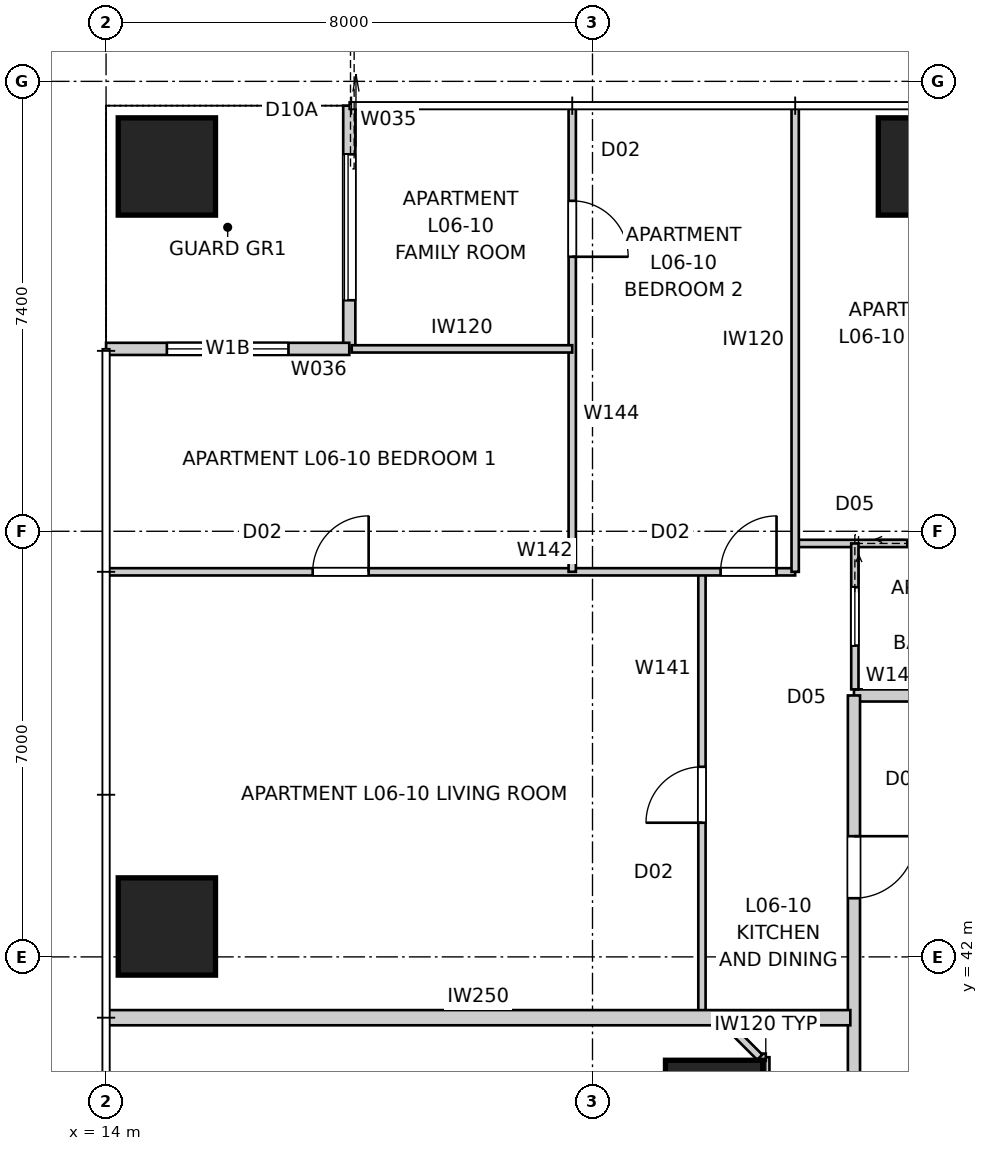
"""IFC4 building model, lengths in metres.
Left out: names, types, materials, properties, quantities, classifications, styles, units other than length and angle.
Written with IfcOpenShell. Run it as: python <this file> out.ifc"""

import sys

from ifc_helpers import new_model, si_unit, direction, frame, frame_2d, origin, origin_2d, place, context, subcontext, project, spatial, rectangle, extrude, element, fill, save


model = new_model("IFC4")
c1 = context("Model", 3, precision=1e-05, world=origin(), true_north=direction((0.0, 1.0)))
c2 = subcontext(c1, "Body", "Model", "MODEL_VIEW")
j1 = project(units=[si_unit("LENGTHUNIT", "METRE"), si_unit("PLANEANGLEUNIT", "RADIAN")], contexts=[c1])
p1 = place(None, origin())
s1 = spatial("IfcSite", under=j1, at=p1, CompositionType="ELEMENT")
p2 = place(p1, origin())
s2 = spatial("IfcBuilding", under=s1, at=p2, CompositionType="ELEMENT")
p3 = place(p2, frame((0.0, 0.0, 25.2)))
s3 = spatial("IfcBuildingStorey", under=s2, at=p3, CompositionType="ELEMENT", Elevation=25.2)
for number, where, z_axis, x_axis in (
    (1, (27.5, 55.0, 0.0), (0.0, 0.0, 1.0), (1.0, 0.0, 0.0)),
    (2, (15.0, 55.0, 0.0), (0.0, 0.0, 1.0), (1.0, 0.0, 0.0)),
    (3, (15.0, 42.5, 0.0), (0.0, 0.0, 1.0), (1.0, 0.0, 0.0)),
    (4, (24.0, 39.5, 0.0), (0.0, 0.0, 1.0), (1.0, 0.0, 0.0)),
):
    element("IfcColumn", number, at=place(p3, frame(where, z_axis=z_axis, x_axis=x_axis)), inside=s3, PredefinedType="COLUMN", context=c2, shape_type="SweptSolid", body=[
        extrude(rectangle(XDim=1.6, YDim=1.6, at=origin_2d()), origin(), (0.0, 0.0, 1.0), 3.4),
    ])
p4 = place(p3, frame((18.0, 56.0, 0.0), z_axis=(0.0, 0.0, 1.0), x_axis=(0.0, -1.0, 0.0)))
e5 = element("IfcWall", 5, at=p4, inside=s3, PredefinedType="SOLIDWALL", context=c2, shape_type="SweptSolid", body=[
    extrude(rectangle(XDim=4.0, YDim=0.2, at=frame_2d((2.0, 0.0))), origin(), (0.0, 0.0, 1.0), 3.25),
])
p5 = place(p4, frame((0.8, 0.0, 0.0)))
e6 = element("IfcOpeningElement", 6, at=p5, cuts=e5, PredefinedType="OPENING", context=c2, shape_type="SweptSolid", body=[
    extrude(rectangle(XDim=2.4, YDim=2.1, at=frame_2d((1.2, 1.05))), frame((0.0, 0.11, 0.0), z_axis=(0.0, -1.0, 0.0), x_axis=(1.0, 0.0, 0.0)), (0.0, 0.0, 1.0), 0.22),
])
p6 = place(p3, frame((18.0, 52.0, 0.0), z_axis=(0.0, 0.0, 1.0), x_axis=(-1.0, 0.0, 0.0)))
e7 = element("IfcWall", 7, at=p6, inside=s3, PredefinedType="SOLIDWALL", context=c2, shape_type="SweptSolid", body=[
    extrude(rectangle(XDim=4.0, YDim=0.2, at=frame_2d((2.0, 0.0))), origin(), (0.0, 0.0, 1.0), 3.25),
])
p7 = place(p6, frame((1.0, 0.0, 0.45)))
e8 = element("IfcOpeningElement", 8, at=p7, cuts=e7, PredefinedType="OPENING", context=c2, shape_type="SweptSolid", body=[
    extrude(rectangle(XDim=2.0, YDim=1.8, at=frame_2d((1.0, 0.9))), frame((0.0, 0.11, 0.0), z_axis=(0.0, -1.0, 0.0), x_axis=(1.0, 0.0, 0.0)), (0.0, 0.0, 1.0), 0.22),
])
p8 = place(p3, frame((30.758, 46.3, 0.0), z_axis=(0.0, 0.0, 1.0), x_axis=(-1.0, 0.0, 0.0)))
e9 = element("IfcWall", 9, at=p8, inside=s3, PredefinedType="PARTITIONING", context=c2, shape_type="SweptSolid", body=[
    extrude(rectangle(XDim=4.458, YDim=0.2, at=frame_2d((2.229, 0.0))), origin(), (0.0, 0.0, 1.0), 3.25),
])
p9 = place(p3, frame((26.3, 46.3, 0.0), z_axis=(0.0, 0.0, 1.0), x_axis=(0.0, -1.0, 0.0)))
e10 = element("IfcWall", 10, at=p9, inside=s3, PredefinedType="PARTITIONING", context=c2, shape_type="SweptSolid", body=[
    extrude(rectangle(XDim=32.6, YDim=0.2, at=frame_2d((16.3, 0.0))), origin(), (0.0, 0.0, 1.0), 3.25),
])
p10 = place(p9, frame((2.315, 0.0, 0.0)))
e11 = element("IfcOpeningElement", 11, at=p10, cuts=e10, PredefinedType="OPENING", context=c2, shape_type="SweptSolid", body=[
    extrude(rectangle(XDim=1.02, YDim=2.34, at=frame_2d((0.51, 1.17))), frame((0.0, 0.11, 0.0), z_axis=(0.0, -1.0, 0.0), x_axis=(1.0, 0.0, 0.0)), (0.0, 0.0, 1.0), 0.22),
])
p11 = place(p9, frame((10.624, 0.0, 0.0)))
e12 = element("IfcOpeningElement", 12, at=p11, cuts=e10, PredefinedType="OPENING", context=c2, shape_type="SweptSolid", body=[
    extrude(rectangle(XDim=1.02, YDim=2.34, at=frame_2d((0.51, 1.17))), frame((0.0, 0.11, 0.0), z_axis=(0.0, -1.0, 0.0), x_axis=(1.0, 0.0, 0.0)), (0.0, 0.0, 1.0), 0.22),
])
p12 = place(p9, frame((17.848, 0.0, 0.0)))
e13 = element("IfcOpeningElement", 13, at=p12, cuts=e10, PredefinedType="OPENING", context=c2, shape_type="SweptSolid", body=[
    extrude(rectangle(XDim=1.02, YDim=2.34, at=frame_2d((0.51, 1.17))), frame((0.0, 0.11, 0.0), z_axis=(0.0, -1.0, 0.0), x_axis=(1.0, 0.0, 0.0)), (0.0, 0.0, 1.0), 0.22),
])
p13 = place(p9, frame((30.516, 0.0, 0.0)))
e14 = element("IfcOpeningElement", 14, at=p13, cuts=e10, PredefinedType="OPENING", context=c2, shape_type="SweptSolid", body=[
    extrude(rectangle(XDim=1.02, YDim=2.34, at=frame_2d((0.51, 1.17))), frame((0.0, 0.11, 0.0), z_axis=(0.0, -1.0, 0.0), x_axis=(1.0, 0.0, 0.0)), (0.0, 0.0, 1.0), 0.22),
])
p14 = place(p3, frame((14.0, 41.0, 0.0), z_axis=(0.0, 0.0, 1.0), x_axis=(1.0, 0.0, 0.0)))
e15 = element("IfcWall", 15, at=p14, inside=s3, PredefinedType="PARTITIONING", context=c2, shape_type="SweptSolid", body=[
    extrude(rectangle(XDim=12.24, YDim=0.25, at=frame_2d((6.12, 0.0))), origin(), (0.0, 0.0, 1.0), 3.25),
])
p15 = place(p3, frame((25.333, 48.8, 0.0), z_axis=(0.0, 0.0, 1.0), x_axis=(1.0, 0.0, 0.0)))
e16 = element("IfcWall", 16, at=p15, inside=s3, PredefinedType="PARTITIONING", context=c2, shape_type="SweptSolid", body=[
    extrude(rectangle(XDim=29.333, YDim=0.12, at=frame_2d((14.667, 0.0))), origin(), (0.0, 0.0, 1.0), 3.25),
])
p16 = place(p15, frame((19.707, 0.0, 0.0)))
e17 = element("IfcOpeningElement", 17, at=p16, cuts=e16, PredefinedType="OPENING", context=c2, shape_type="SweptSolid", body=[
    extrude(rectangle(XDim=0.92, YDim=2.34, at=frame_2d((0.46, 1.17))), frame((0.0, 0.07, 0.0), z_axis=(0.0, -1.0, 0.0), x_axis=(1.0, 0.0, 0.0)), (0.0, 0.0, 1.0), 0.14),
])
p17 = place(p15, frame((23.348, 0.0, 0.0)))
e18 = element("IfcOpeningElement", 18, at=p17, cuts=e16, PredefinedType="OPENING", context=c2, shape_type="SweptSolid", body=[
    extrude(rectangle(XDim=0.92, YDim=2.34, at=frame_2d((0.46, 1.17))), frame((0.0, 0.07, 0.0), z_axis=(0.0, -1.0, 0.0), x_axis=(1.0, 0.0, 0.0)), (0.0, 0.0, 1.0), 0.14),
])
p18 = place(p15, frame((16.884, 0.0, 0.0)))
e19 = element("IfcOpeningElement", 19, at=p18, cuts=e16, PredefinedType="OPENING", context=c2, shape_type="SweptSolid", body=[
    extrude(rectangle(XDim=0.92, YDim=2.34, at=frame_2d((0.46, 1.17))), frame((0.0, 0.07, 0.0), z_axis=(0.0, -1.0, 0.0), x_axis=(1.0, 0.0, 0.0)), (0.0, 0.0, 1.0), 0.14),
])
p19 = place(p15, frame((26.549, 0.0, 0.0)))
e20 = element("IfcOpeningElement", 20, at=p19, cuts=e16, PredefinedType="OPENING", context=c2, shape_type="SweptSolid", body=[
    extrude(rectangle(XDim=0.96, YDim=2.1, at=frame_2d((0.48, 1.05))), frame((0.0, 0.07, 0.0), z_axis=(0.0, -1.0, 0.0), x_axis=(1.0, 0.0, 0.0)), (0.0, 0.0, 1.0), 0.14),
])
p20 = place(p15, frame((1.844, 0.0, 0.0)))
e21 = element("IfcOpeningElement", 21, at=p20, cuts=e16, PredefinedType="OPENING", context=c2, shape_type="SweptSolid", body=[
    extrude(rectangle(XDim=0.96, YDim=2.1, at=frame_2d((0.48, 1.05))), frame((0.0, 0.07, 0.0), z_axis=(0.0, -1.0, 0.0), x_axis=(1.0, 0.0, 0.0)), (0.0, 0.0, 1.0), 0.14),
])
p21 = place(p15, frame((8.484, 0.0, 0.0)))
e22 = element("IfcOpeningElement", 22, at=p21, cuts=e16, PredefinedType="OPENING", context=c2, shape_type="SweptSolid", body=[
    extrude(rectangle(XDim=0.96, YDim=2.1, at=frame_2d((0.48, 1.05))), frame((0.0, 0.07, 0.0), z_axis=(0.0, -1.0, 0.0), x_axis=(1.0, 0.0, 0.0)), (0.0, 0.0, 1.0), 0.14),
])
p22 = place(p3, frame((26.315, 48.8, 0.0), z_axis=(0.0, 0.0, 1.0), x_axis=(0.0, -1.0, 0.0)))
e23 = element("IfcWall", 23, at=p22, inside=s3, PredefinedType="PARTITIONING", context=c2, shape_type="SweptSolid", body=[
    extrude(rectangle(XDim=2.4, YDim=0.12, at=frame_2d((1.2, 0.0))), origin(), (0.0, 0.0, 1.0), 3.25),
])
p23 = place(p22, frame((0.72, 0.0, 0.0)))
e24 = element("IfcOpeningElement", 24, at=p23, cuts=e23, PredefinedType="OPENING", context=c2, shape_type="SweptSolid", body=[
    extrude(rectangle(XDim=0.96, YDim=2.1, at=frame_2d((0.48, 1.05))), frame((0.0, 0.07, 0.0), z_axis=(0.0, -1.0, 0.0), x_axis=(1.0, 0.0, 0.0)), (0.0, 0.0, 1.0), 0.14),
])
p24 = place(p3, frame((23.8, 41.0, 0.0), z_axis=(0.0, 0.0, 1.0), x_axis=(0.0, 1.0, 0.0)))
e25 = element("IfcWall", 25, at=p24, inside=s3, PredefinedType="PARTITIONING", context=c2, shape_type="SweptSolid", body=[
    extrude(rectangle(XDim=7.333, YDim=0.12, at=frame_2d((3.667, 0.0))), origin(), (0.0, 0.0, 1.0), 3.25),
])
p25 = place(p24, frame((3.207, 0.0, 0.0)))
e26 = element("IfcOpeningElement", 26, at=p25, cuts=e25, PredefinedType="OPENING", context=c2, shape_type="SweptSolid", body=[
    extrude(rectangle(XDim=0.92, YDim=2.34, at=frame_2d((0.46, 1.17))), frame((0.0, 0.07, 0.0), z_axis=(0.0, -1.0, 0.0), x_axis=(1.0, 0.0, 0.0)), (0.0, 0.0, 1.0), 0.14),
])
p26 = place(p3, frame((14.04, 48.333, 0.0), z_axis=(0.0, 0.0, 1.0), x_axis=(1.0, 0.0, 0.0)))
e27 = element("IfcWall", 27, at=p26, inside=s3, PredefinedType="PARTITIONING", context=c2, shape_type="SweptSolid", body=[
    extrude(rectangle(XDim=11.293, YDim=0.12, at=frame_2d((5.646, 0.0))), origin(), (0.0, 0.0, 1.0), 3.25),
])
p27 = place(p26, frame((10.067, 0.0, 0.0)))
e28 = element("IfcOpeningElement", 28, at=p27, cuts=e27, PredefinedType="OPENING", context=c2, shape_type="SweptSolid", body=[
    extrude(rectangle(XDim=0.92, YDim=2.34, at=frame_2d((0.46, 1.17))), frame((0.0, 0.07, 0.0), z_axis=(0.0, -1.0, 0.0), x_axis=(1.0, 0.0, 0.0)), (0.0, 0.0, 1.0), 0.14),
])
p28 = place(p26, frame((3.358, 0.0, 0.0)))
e29 = element("IfcOpeningElement", 29, at=p28, cuts=e27, PredefinedType="OPENING", context=c2, shape_type="SweptSolid", body=[
    extrude(rectangle(XDim=0.92, YDim=2.34, at=frame_2d((0.46, 1.17))), frame((0.0, 0.07, 0.0), z_axis=(0.0, -1.0, 0.0), x_axis=(1.0, 0.0, 0.0)), (0.0, 0.0, 1.0), 0.14),
])
p29 = place(p3, frame((25.333, 48.333, 0.0), z_axis=(0.0, 0.0, 1.0), x_axis=(0.0, 1.0, 0.0)))
e30 = element("IfcWall", 30, at=p29, inside=s3, PredefinedType="PARTITIONING", context=c2, shape_type="SweptSolid", body=[
    extrude(rectangle(XDim=7.627, YDim=0.12, at=frame_2d((3.813, 0.0))), origin(), (0.0, 0.0, 1.0), 2.637),
])
p30 = place(p3, frame((21.667, 55.96, 0.0), z_axis=(0.0, 0.0, 1.0), x_axis=(0.0, -1.0, 0.0)))
e31 = element("IfcWall", 31, at=p30, inside=s3, PredefinedType="PARTITIONING", context=c2, shape_type="SweptSolid", body=[
    extrude(rectangle(XDim=7.627, YDim=0.12, at=frame_2d((3.813, 0.0))), origin(), (0.0, 0.0, 1.0), 3.25),
])
p31 = place(p30, frame((1.525, 0.0, 0.0)))
e32 = element("IfcOpeningElement", 32, at=p31, cuts=e31, PredefinedType="OPENING", context=c2, shape_type="SweptSolid", body=[
    extrude(rectangle(XDim=0.92, YDim=2.34, at=frame_2d((0.46, 1.17))), frame((0.0, 0.07, 0.0), z_axis=(0.0, -1.0, 0.0), x_axis=(1.0, 0.0, 0.0)), (0.0, 0.0, 1.0), 0.14),
])
p32 = place(p3, frame((18.04, 52.0, 0.0), z_axis=(0.0, 0.0, 1.0), x_axis=(1.0, 0.0, 0.0)))
e33 = element("IfcWall", 33, at=p32, inside=s3, PredefinedType="PARTITIONING", context=c2, shape_type="SweptSolid", body=[
    extrude(rectangle(XDim=3.627, YDim=0.12, at=frame_2d((1.813, 0.0))), origin(), (0.0, 0.0, 1.0), 3.25),
])
p33 = place(p3, frame((24.85, 38.65, 0.0), z_axis=(0.0, 0.0, 1.0), x_axis=(0.0, 1.0, 0.0)))
e34 = element("IfcWall", 34, at=p33, inside=s3, PredefinedType="PARTITIONING", context=c2, shape_type="SweptSolid", body=[
    extrude(rectangle(XDim=1.7, YDim=0.12, at=frame_2d((0.85, 0.0))), origin(), (0.0, 0.0, 1.0), 3.25),
])
p34 = place(p3, frame((24.75, 40.35, 0.0), z_axis=(0.0, 0.0, 1.0), x_axis=(-0.707106781187, 0.707106781187, 0.0)))
e35 = element("IfcWall", 35, at=p34, inside=s3, PredefinedType="PARTITIONING", context=c2, shape_type="SweptSolid", body=[
    extrude(rectangle(XDim=0.919, YDim=0.12, at=frame_2d((0.459, 0.0))), origin(), (0.0, 0.0, 1.0), 3.25),
])
p35 = place(p3, frame((24.85, 40.35, 0.0), z_axis=(0.0, 0.0, 1.0), x_axis=(-1.0, 0.0, 0.0)))
e36 = element("IfcWall", 36, at=p35, inside=s3, PredefinedType="PARTITIONING", context=c2, shape_type="SweptSolid", body=[
    extrude(rectangle(XDim=0.1, YDim=0.12, at=frame_2d((0.05, 0.0))), origin(), (0.0, 0.0, 1.0), 3.25),
])
p36 = place(p5, origin())
e37 = element("IfcDoor", 37, at=p36, inside=s3, OperationType="SLIDING_TO_LEFT", PredefinedType="DOOR", context=c2, shape_type="SweptSolid", body=[
    extrude(rectangle(XDim=2.4, YDim=2.1, at=frame_2d((1.2, 1.05))), frame((0.0, 0.025, 0.0), z_axis=(0.0, -1.0, 0.0), x_axis=(1.0, 0.0, 0.0)), (0.0, 0.0, 1.0), 0.05),
])
fill(e6, e37)
p37 = place(p7, origin())
e38 = element("IfcWindow", 38, at=p37, inside=s3, PartitioningType="SINGLE_PANEL", PredefinedType="WINDOW", context=c2, shape_type="SweptSolid", body=[
    extrude(rectangle(XDim=2.0, YDim=1.8, at=frame_2d((1.0, 0.9))), frame((0.0, 0.03, 0.0), z_axis=(0.0, -1.0, 0.0), x_axis=(1.0, 0.0, 0.0)), (0.0, 0.0, 1.0), 0.06),
])
fill(e8, e38)
p38 = place(p10, origin())
e39 = element("IfcDoor", 39, at=p38, inside=s3, OperationType="SINGLE_SWING_LEFT", PredefinedType="DOOR", context=c2, shape_type="SweptSolid", body=[
    extrude(rectangle(XDim=1.02, YDim=2.34, at=frame_2d((0.51, 1.17))), frame((0.0, 0.025, 0.0), z_axis=(0.0, -1.0, 0.0), x_axis=(1.0, 0.0, 0.0)), (0.0, 0.0, 1.0), 0.05),
])
fill(e11, e39)
p39 = place(p25, origin())
e40 = element("IfcDoor", 40, at=p39, inside=s3, OperationType="SINGLE_SWING_LEFT", PredefinedType="DOOR", context=c2, shape_type="SweptSolid", body=[
    extrude(rectangle(XDim=0.92, YDim=2.34, at=frame_2d((0.46, 1.17))), frame((0.0, 0.025, 0.0), z_axis=(0.0, -1.0, 0.0), x_axis=(1.0, 0.0, 0.0)), (0.0, 0.0, 1.0), 0.05),
])
fill(e26, e40)
p40 = place(p23, origin())
e41 = element("IfcDoor", 41, at=p40, inside=s3, OperationType="SLIDING_TO_LEFT", PredefinedType="DOOR", context=c2, shape_type="SweptSolid", body=[
    extrude(rectangle(XDim=0.96, YDim=2.1, at=frame_2d((0.48, 1.05))), frame((0.0, 0.025, 0.0), z_axis=(0.0, -1.0, 0.0), x_axis=(1.0, 0.0, 0.0)), (0.0, 0.0, 1.0), 0.05),
])
fill(e24, e41)
p41 = place(p27, origin())
e42 = element("IfcDoor", 42, at=p41, inside=s3, OperationType="SINGLE_SWING_RIGHT", PredefinedType="DOOR", context=c2, shape_type="SweptSolid", body=[
    extrude(rectangle(XDim=0.92, YDim=2.34, at=frame_2d((0.46, 1.17))), frame((0.0, 0.025, 0.0), z_axis=(0.0, -1.0, 0.0), x_axis=(1.0, 0.0, 0.0)), (0.0, 0.0, 1.0), 0.05),
])
fill(e28, e42)
p42 = place(p28, origin())
e43 = element("IfcDoor", 43, at=p42, inside=s3, OperationType="SINGLE_SWING_RIGHT", PredefinedType="DOOR", context=c2, shape_type="SweptSolid", body=[
    extrude(rectangle(XDim=0.92, YDim=2.34, at=frame_2d((0.46, 1.17))), frame((0.0, 0.025, 0.0), z_axis=(0.0, -1.0, 0.0), x_axis=(1.0, 0.0, 0.0)), (0.0, 0.0, 1.0), 0.05),
])
fill(e29, e43)
p43 = place(p20, origin())
e44 = element("IfcDoor", 44, at=p43, inside=s3, OperationType="SLIDING_TO_LEFT", PredefinedType="DOOR", context=c2, shape_type="SweptSolid", body=[
    extrude(rectangle(XDim=0.96, YDim=2.1, at=frame_2d((0.48, 1.05))), frame((0.0, 0.025, 0.0), z_axis=(0.0, -1.0, 0.0), x_axis=(1.0, 0.0, 0.0)), (0.0, 0.0, 1.0), 0.05),
])
fill(e21, e44)
p44 = place(p31, origin())
e45 = element("IfcDoor", 45, at=p44, inside=s3, OperationType="SINGLE_SWING_RIGHT", PredefinedType="DOOR", context=c2, shape_type="SweptSolid", body=[
    extrude(rectangle(XDim=0.92, YDim=2.34, at=frame_2d((0.46, 1.17))), frame((0.0, 0.025, 0.0), z_axis=(0.0, -1.0, 0.0), x_axis=(1.0, 0.0, 0.0)), (0.0, 0.0, 1.0), 0.05),
])
fill(e32, e45)
save(model, sys.argv[1])
